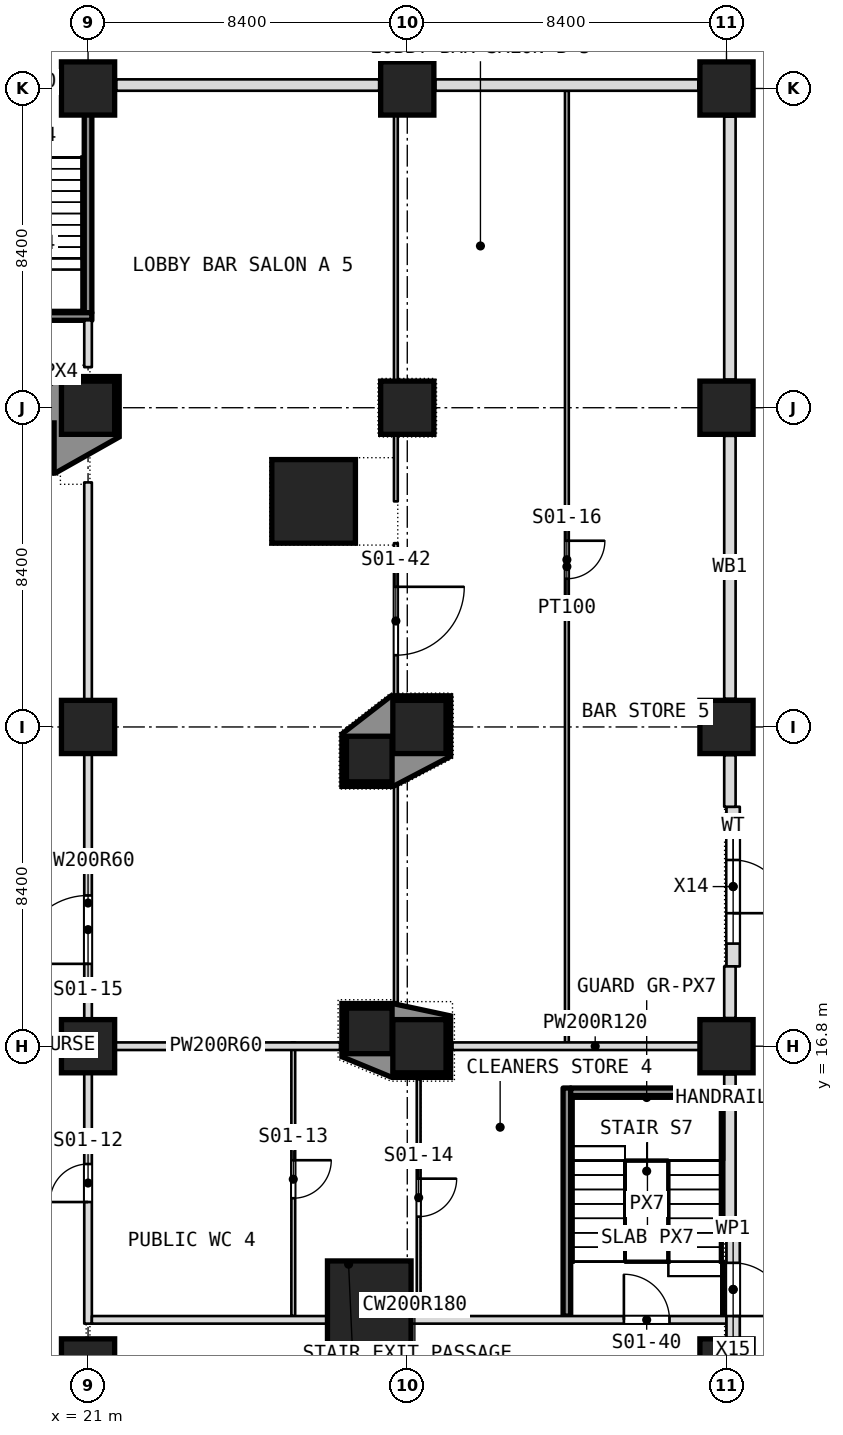
"""IFC4 building model, lengths in metres.
Left out: names, types, materials, properties, quantities, classifications, styles, units other than length and angle.
Written with IfcOpenShell. Run it as: python <this file> out.ifc"""

import sys

from ifc_helpers import new_model, si_unit, direction, frame, frame_2d, origin, origin_2d, place, context, subcontext, project, spatial, polyline, rectangle, outline, extrude, element, fill, save


model = new_model("IFC4")
c1 = context("Model", 3, precision=1e-05, world=origin(), true_north=direction((0.0, 1.0)))
c2 = subcontext(c1, "Body", "Model", "MODEL_VIEW")
j1 = project(units=[si_unit("LENGTHUNIT", "METRE"), si_unit("PLANEANGLEUNIT", "RADIAN")], contexts=[c1])
p1 = place(None, origin())
s1 = spatial("IfcSite", under=j1, at=p1, CompositionType="ELEMENT")
p2 = place(p1, origin())
s2 = spatial("IfcBuilding", under=s1, at=p2, CompositionType="ELEMENT")
p3 = place(p2, origin())
s3 = spatial("IfcBuildingStorey", under=s2, at=p3, CompositionType="ELEMENT", Elevation=0.0)
for number, where, z_axis, x_axis in (
    (1, (21.0, 8.4, -0.3), (0.0, 0.0, 1.0), (1.0, 0.0, 0.0)),
    (2, (37.8, 8.4, -0.3), (0.0, 0.0, 1.0), (1.0, 0.0, 0.0)),
    (3, (21.0, 16.8, -0.3), (0.0, 0.0, 1.0), (1.0, 0.0, 0.0)),
    (4, (29.72, 16.8, -0.3), (0.0, 0.0, 1.0), (1.0, 0.0, 0.0)),
    (5, (37.8, 16.8, -0.3), (0.0, 0.0, 1.0), (1.0, 0.0, 0.0)),
    (6, (21.0, 25.2, -0.3), (0.0, 0.0, 1.0), (1.0, 0.0, 0.0)),
    (7, (29.72, 25.2, -0.3), (0.0, 0.0, 1.0), (1.0, 0.0, 0.0)),
    (8, (37.8, 25.2, -0.3), (0.0, 0.0, 1.0), (1.0, 0.0, 0.0)),
    (9, (21.0, 33.6, -0.3), (0.0, 0.0, 1.0), (1.0, 0.0, 0.0)),
    (10, (29.4, 33.6, -0.3), (0.0, 0.0, 1.0), (1.0, 0.0, 0.0)),
    (11, (37.8, 33.6, -0.3), (0.0, 0.0, 1.0), (1.0, 0.0, 0.0)),
    (12, (21.0, 42.0, -0.3), (0.0, 0.0, 1.0), (1.0, 0.0, 0.0)),
    (13, (29.4, 42.0, -0.3), (0.0, 0.0, 1.0), (1.0, 0.0, 0.0)),
    (14, (37.8, 42.0, -0.3), (0.0, 0.0, 1.0), (1.0, 0.0, 0.0)),
):
    element("IfcColumn", number, at=place(p3, frame(where, z_axis=z_axis, x_axis=x_axis)), inside=s3, PredefinedType="COLUMN", context=c2, shape_type="SweptSolid", body=[
        extrude(rectangle(XDim=1.4, YDim=1.4, at=origin_2d()), origin(), (0.0, 0.0, 1.0), 8.3),
    ])
for number, where, z_axis, x_axis in (
    (15, (28.4, 10.05, -0.3), (0.0, 0.0, 1.0), (1.0, 0.0, 0.0)),
    (16, (26.936, 31.135, -0.3), (0.0, 0.0, 1.0), (1.0, 0.0, 0.0)),
):
    element("IfcColumn", number, at=place(p3, frame(where, z_axis=z_axis, x_axis=x_axis)), inside=s3, PredefinedType="COLUMN", context=c2, shape_type="SweptSolid", body=[
        extrude(rectangle(XDim=2.2, YDim=2.2, at=origin_2d()), origin(), (0.0, 0.0, 1.0), 8.3),
    ])
for number, where, z_axis, x_axis in (
    (17, (19.507, 32.6, -0.3), (0.0, 0.0, 1.0), (1.0, 0.0, 0.0)),
    (18, (28.4, 24.356, -0.3), (0.0, 0.0, 1.0), (1.0, 0.0, 0.0)),
    (19, (28.4, 17.203, -0.3), (0.0, 0.0, 1.0), (1.0, 0.0, 0.0)),
):
    element("IfcColumn", number, at=place(p3, frame(where, z_axis=z_axis, x_axis=x_axis)), inside=s3, PredefinedType="COLUMN", context=c2, shape_type="SweptSolid", body=[
        extrude(rectangle(XDim=1.2, YDim=1.2, at=origin_2d()), origin(), (0.0, 0.0, 1.0), 8.3),
    ])
p4 = place(p3, frame((33.6, 9.7, 0.0), z_axis=(0.0, 0.0, 1.0), x_axis=(0.0, 1.0, 0.0)))
e20 = element("IfcWall", 20, at=p4, inside=s3, PredefinedType="PARTITIONING", context=c2, shape_type="SweptSolid", body=[
    extrude(rectangle(XDim=6.0, YDim=0.2, at=frame_2d((3.0, 0.0))), origin(), (0.0, 0.0, 1.0), 7.68),
])
p5 = place(p3, frame((33.6, 16.9, 0.0), z_axis=(0.0, 0.0, 1.0), x_axis=(0.0, 1.0, 0.0)))
e21 = element("IfcWall", 21, at=p5, inside=s3, PredefinedType="PARTITIONING", context=c2, shape_type="SweptSolid", body=[
    extrude(rectangle(XDim=25.04, YDim=0.1, at=frame_2d((12.52, 0.0))), origin(), (0.0, 0.0, 1.0), 7.68),
])
p6 = place(p5, frame((12.2, 0.0, 0.0)))
e22 = element("IfcOpeningElement", 22, at=p6, cuts=e21, PredefinedType="OPENING", context=c2, shape_type="SweptSolid", body=[
    extrude(rectangle(XDim=1.0, YDim=2.1, at=frame_2d((0.5, 1.05))), frame((0.0, 0.05, 0.0), z_axis=(0.0, -1.0, 0.0), x_axis=(1.0, 0.0, 0.0)), (0.0, 0.0, 1.0), 0.1),
])
p7 = place(p3, frame((29.7, 9.7, 0.0), z_axis=(0.0, 0.0, 1.0), x_axis=(0.0, 1.0, 0.0)))
e23 = element("IfcWall", 23, at=p7, inside=s3, PredefinedType="PARTITIONING", context=c2, shape_type="SweptSolid", body=[
    extrude(rectangle(XDim=6.23, YDim=0.1, at=frame_2d((3.115, 0.0))), origin(), (0.0, 0.0, 1.0), 7.68),
])
p8 = place(p7, frame((2.615, 0.0, 0.0)))
e24 = element("IfcOpeningElement", 24, at=p8, cuts=e23, PredefinedType="OPENING", context=c2, shape_type="SweptSolid", body=[
    extrude(rectangle(XDim=1.0, YDim=2.1, at=frame_2d((0.5, 1.05))), frame((0.0, 0.05, 0.0), z_axis=(0.0, -1.0, 0.0), x_axis=(1.0, 0.0, 0.0)), (0.0, 0.0, 1.0), 0.1),
])
p9 = place(p3, frame((29.1, 17.956, 0.0), z_axis=(0.0, 0.0, 1.0), x_axis=(0.0, 1.0, 0.0)))
e25 = element("IfcWall", 25, at=p9, inside=s3, PredefinedType="PARTITIONING", context=c2, shape_type="SweptSolid", body=[
    extrude(rectangle(XDim=5.695, YDim=0.1, at=frame_2d((2.847, 0.0))), origin(), (0.0, 0.0, 1.0), 7.68),
])
p10 = place(p3, frame((29.1, 26.04, 0.0), z_axis=(0.0, 0.0, 1.0), x_axis=(0.0, 1.0, 0.0)))
e26 = element("IfcWall", 26, at=p10, inside=s3, PredefinedType="PARTITIONING", context=c2, shape_type="SweptSolid", body=[
    extrude(rectangle(XDim=3.996, YDim=0.1, at=frame_2d((1.998, 0.0))), origin(), (0.0, 0.0, 1.0), 7.68),
])
p11 = place(p10, frame((1.048, 0.0, 0.0)))
e27 = element("IfcOpeningElement", 27, at=p11, cuts=e26, PredefinedType="OPENING", context=c2, shape_type="SweptSolid", body=[
    extrude(rectangle(XDim=1.8, YDim=2.1, at=frame_2d((0.9, 1.05))), frame((0.0, 0.05, 0.0), z_axis=(0.0, -1.0, 0.0), x_axis=(1.0, 0.0, 0.0)), (0.0, 0.0, 1.0), 0.1),
])
p12 = place(p3, frame((29.1, 31.136, 0.0), z_axis=(0.0, 0.0, 1.0), x_axis=(0.0, 1.0, 0.0)))
e28 = element("IfcWall", 28, at=p12, inside=s3, PredefinedType="PARTITIONING", context=c2, shape_type="SweptSolid", body=[
    extrude(rectangle(XDim=1.744, YDim=0.1, at=frame_2d((0.872, 0.0))), origin(), (0.0, 0.0, 1.0), 7.68),
])
p13 = place(p3, frame((29.1, 34.32, 0.0), z_axis=(0.0, 0.0, 1.0), x_axis=(0.0, 1.0, 0.0)))
e29 = element("IfcWall", 29, at=p13, inside=s3, PredefinedType="PARTITIONING", context=c2, shape_type="SweptSolid", body=[
    extrude(rectangle(XDim=7.98, YDim=0.1, at=frame_2d((3.99, 0.0))), origin(), (0.0, 0.0, 1.0), 7.68),
])
p14 = place(p3, frame((26.4, 9.7, 0.0), z_axis=(0.0, 0.0, 1.0), x_axis=(0.0, 1.0, 0.0)))
e30 = element("IfcWall", 30, at=p14, inside=s3, PredefinedType="PARTITIONING", context=c2, shape_type="SweptSolid", body=[
    extrude(rectangle(XDim=7.2, YDim=0.1, at=frame_2d((3.6, 0.0))), origin(), (0.0, 0.0, 1.0), 7.68),
])
p15 = place(p14, frame((3.1, 0.0, 0.0)))
e31 = element("IfcOpeningElement", 31, at=p15, cuts=e30, PredefinedType="OPENING", context=c2, shape_type="SweptSolid", body=[
    extrude(rectangle(XDim=1.0, YDim=2.1, at=frame_2d((0.5, 1.05))), frame((0.0, 0.05, 0.0), z_axis=(0.0, -1.0, 0.0), x_axis=(1.0, 0.0, 0.0)), (0.0, 0.0, 1.0), 0.1),
])
p16 = place(p3, frame((21.0, 9.5, 0.0), z_axis=(0.0, 0.0, 1.0), x_axis=(0.0, 1.0, 0.0)))
e32 = element("IfcWall", 32, at=p16, inside=s3, PredefinedType="PARTITIONING", context=c2, shape_type="SweptSolid", body=[
    extrude(rectangle(XDim=22.135, YDim=0.2, at=frame_2d((11.067, 0.0))), origin(), (0.0, 0.0, 1.0), 7.68),
])
p17 = place(p16, frame((3.2, 0.0, 0.0)))
e33 = element("IfcOpeningElement", 33, at=p17, cuts=e32, PredefinedType="OPENING", context=c2, shape_type="SweptSolid", body=[
    extrude(rectangle(XDim=1.0, YDim=2.1, at=frame_2d((0.5, 1.05))), frame((0.0, 0.1, 0.0), z_axis=(0.0, -1.0, 0.0), x_axis=(1.0, 0.0, 0.0)), (0.0, 0.0, 1.0), 0.2),
])
p18 = place(p16, frame((9.467, 0.0, 0.0)))
e34 = element("IfcOpeningElement", 34, at=p18, cuts=e32, PredefinedType="OPENING", context=c2, shape_type="SweptSolid", body=[
    extrude(rectangle(XDim=1.8, YDim=2.1, at=frame_2d((0.9, 1.05))), frame((0.0, 0.1, 0.0), z_axis=(0.0, -1.0, 0.0), x_axis=(1.0, 0.0, 0.0)), (0.0, 0.0, 1.0), 0.2),
])
p19 = place(p3, frame((21.0, 34.668, 0.0), z_axis=(0.0, 0.0, 1.0), x_axis=(0.0, 1.0, 0.0)))
e35 = element("IfcWall", 35, at=p19, inside=s3, PredefinedType="PARTITIONING", context=c2, shape_type="SweptSolid", body=[
    extrude(rectangle(XDim=1.232, YDim=0.2, at=frame_2d((0.616, 0.0))), origin(), (0.0, 0.0, 1.0), 7.68),
])
p20 = place(p3, frame((21.0, 36.1, 0.0), z_axis=(0.0, 0.0, 1.0), x_axis=(0.0, 1.0, 0.0)))
e36 = element("IfcWall", 36, at=p20, inside=s3, PredefinedType="PARTITIONING", context=c2, shape_type="SweptSolid", body=[
    extrude(rectangle(XDim=6.2, YDim=0.2, at=frame_2d((3.1, 0.0))), origin(), (0.0, 0.0, 1.0), 7.68),
])
p21 = place(p3, frame((21.1, 9.6, 0.0), z_axis=(0.0, 0.0, 1.0), x_axis=(1.0, 0.0, 0.0)))
e37 = element("IfcWall", 37, at=p21, inside=s3, PredefinedType="PARTITIONING", context=c2, shape_type="SweptSolid", body=[
    extrude(rectangle(XDim=16.7, YDim=0.2, at=frame_2d((8.35, 0.0))), origin(), (0.0, 0.0, 1.0), 7.68),
])
p22 = place(p21, frame((14.0, 0.0, 0.0)))
e38 = element("IfcOpeningElement", 38, at=p22, cuts=e37, PredefinedType="OPENING", context=c2, shape_type="SweptSolid", body=[
    extrude(rectangle(XDim=1.2, YDim=2.1, at=frame_2d((0.6, 1.05))), frame((0.0, 0.1, 0.0), z_axis=(0.0, -1.0, 0.0), x_axis=(1.0, 0.0, 0.0)), (0.0, 0.0, 1.0), 0.2),
])
p23 = place(p3, frame((33.7, 15.6, 0.0), z_axis=(0.0, 0.0, 1.0), x_axis=(1.0, 0.0, 0.0)))
e39 = element("IfcWall", 39, at=p23, inside=s3, PredefinedType="PARTITIONING", context=c2, shape_type="SweptSolid", body=[
    extrude(rectangle(XDim=4.04, YDim=0.2, at=frame_2d((2.02, 0.0))), origin(), (0.0, 0.0, 1.0), 7.68),
])
p24 = place(p3, frame((21.1, 16.8, 0.0), z_axis=(0.0, 0.0, 1.0), x_axis=(1.0, 0.0, 0.0)))
e40 = element("IfcWall", 40, at=p24, inside=s3, PredefinedType="PARTITIONING", context=c2, shape_type="SweptSolid", body=[
    extrude(rectangle(XDim=6.53, YDim=0.2, at=frame_2d((3.265, 0.0))), origin(), (0.0, 0.0, 1.0), 7.68),
])
p25 = place(p3, frame((30.59, 16.8, 0.0), z_axis=(0.0, 0.0, 1.0), x_axis=(1.0, 0.0, 0.0)))
e41 = element("IfcWall", 41, at=p25, inside=s3, PredefinedType="PARTITIONING", context=c2, shape_type="SweptSolid", body=[
    extrude(rectangle(XDim=7.51, YDim=0.2, at=frame_2d((3.755, 0.0))), origin(), (0.0, 0.0, 1.0), 7.68),
])
p26 = place(p3, frame((16.7, 36.0, 0.0), z_axis=(0.0, 0.0, 1.0), x_axis=(1.0, 0.0, 0.0)))
e42 = element("IfcWall", 42, at=p26, inside=s3, PredefinedType="PARTITIONING", context=c2, shape_type="SweptSolid", body=[
    extrude(rectangle(XDim=4.4, YDim=0.2, at=frame_2d((2.2, 0.0))), origin(), (0.0, 0.0, 1.0), 7.68),
])
p27 = place(p26, frame((1.6, 0.0, 0.0)))
e43 = element("IfcOpeningElement", 43, at=p27, cuts=e42, PredefinedType="OPENING", context=c2, shape_type="SweptSolid", body=[
    extrude(rectangle(XDim=1.2, YDim=2.1, at=frame_2d((0.6, 1.05))), frame((0.0, 0.1, 0.0), z_axis=(0.0, -1.0, 0.0), x_axis=(1.0, 0.0, 0.0)), (0.0, 0.0, 1.0), 0.2),
])
p28 = place(p3, frame((37.975, 18.9, 0.0), z_axis=(0.0, 0.0, 1.0), x_axis=(0.0, 1.0, 0.0)))
e44 = element("IfcWall", 44, at=p28, inside=s3, PredefinedType="NOTDEFINED", context=c2, shape_type="SweptSolid", body=[
    extrude(rectangle(XDim=4.2, YDim=0.35, at=frame_2d((2.1, 0.0))), origin(), (0.0, 0.0, 1.0), 6.78),
])
p29 = place(p28, frame((1.4, 0.0, 0.0)))
e45 = element("IfcOpeningElement", 45, at=p29, cuts=e44, PredefinedType="OPENING", context=c2, shape_type="SweptSolid", body=[
    extrude(rectangle(XDim=1.4, YDim=2.2, at=frame_2d((0.7, 1.1))), frame((0.0, 0.175, 0.0), z_axis=(0.0, -1.0, 0.0), x_axis=(1.0, 0.0, 0.0)), (0.0, 0.0, 1.0), 0.35),
])
p30 = place(p28, frame((0.6, 0.0, 2.9)))
e46 = element("IfcOpeningElement", 46, at=p30, cuts=e44, PredefinedType="OPENING", context=c2, shape_type="SweptSolid", body=[
    extrude(rectangle(XDim=3.0, YDim=2.6, at=frame_2d((1.5, 1.3))), frame((0.0, 0.175, 0.0), z_axis=(0.0, -1.0, 0.0), x_axis=(1.0, 0.0, 0.0)), (0.0, 0.0, 1.0), 0.35),
])
p31 = place(p3, frame((37.975, 9.1, 0.0), z_axis=(0.0, 0.0, 1.0), x_axis=(0.0, 1.0, 0.0)))
e47 = element("IfcWall", 47, at=p31, inside=s3, PredefinedType="NOTDEFINED", context=c2, shape_type="SweptSolid", body=[
    extrude(rectangle(XDim=2.6, YDim=0.35, at=frame_2d((1.3, 0.0))), origin(), (0.0, 0.0, 1.0), 8.0),
])
p32 = place(p31, frame((0.6, 0.0, 0.0)))
e48 = element("IfcOpeningElement", 48, at=p32, cuts=e47, PredefinedType="OPENING", context=c2, shape_type="SweptSolid", body=[
    extrude(rectangle(XDim=1.4, YDim=2.2, at=frame_2d((0.7, 1.1))), frame((0.0, 0.175, 0.0), z_axis=(0.0, -1.0, 0.0), x_axis=(1.0, 0.0, 0.0)), (0.0, 0.0, 1.0), 0.35),
])
p33 = place(p3, frame((37.89, 11.7, 0.0), z_axis=(0.0, 0.0, 1.0), x_axis=(0.0, 1.0, 0.0)))
e49 = element("IfcWall", 49, at=p33, inside=s3, PredefinedType="NOTDEFINED", context=c2, shape_type="SweptSolid", body=[
    extrude(rectangle(XDim=4.36, YDim=0.3, at=frame_2d((2.18, 0.0))), origin(), (0.0, 0.0, 1.0), 8.0),
])
for number, where, z_axis, x_axis in (
    (50, (37.89, 17.54, 0.0), (0.0, 0.0, 1.0), (0.0, 1.0, 0.0)),
    (51, (37.89, 23.1, 0.0), (0.0, 0.0, 1.0), (0.0, 1.0, 0.0)),
):
    element("IfcWall", number, at=place(p3, frame(where, z_axis=z_axis, x_axis=x_axis)), inside=s3, PredefinedType="NOTDEFINED", context=c2, shape_type="SweptSolid", body=[
        extrude(rectangle(XDim=1.36, YDim=0.3, at=frame_2d((0.68, 0.0))), origin(), (0.0, 0.0, 1.0), 6.78),
    ])
p34 = place(p3, frame((37.89, 25.94, 0.0), z_axis=(0.0, 0.0, 1.0), x_axis=(0.0, 1.0, 0.0)))
e52 = element("IfcWall", 52, at=p34, inside=s3, PredefinedType="NOTDEFINED", context=c2, shape_type="SweptSolid", body=[
    extrude(rectangle(XDim=6.92, YDim=0.3, at=frame_2d((3.46, 0.0))), origin(), (0.0, 0.0, 1.0), 6.78),
])
p35 = place(p3, frame((37.89, 34.34, 0.0), z_axis=(0.0, 0.0, 1.0), x_axis=(0.0, 1.0, 0.0)))
e53 = element("IfcWall", 53, at=p35, inside=s3, PredefinedType="NOTDEFINED", context=c2, shape_type="SweptSolid", body=[
    extrude(rectangle(XDim=6.92, YDim=0.3, at=frame_2d((3.46, 0.0))), origin(), (0.0, 0.0, 1.0), 6.78),
])
p36 = place(p3, frame((20.2, 42.175, 0.0), z_axis=(0.0, 0.0, 1.0), x_axis=(-1.0, 0.0, 0.0)))
e54 = element("IfcWall", 54, at=p36, inside=s3, PredefinedType="NOTDEFINED", context=c2, shape_type="SweptSolid", body=[
    extrude(rectangle(XDim=4.2, YDim=0.35, at=frame_2d((2.1, 0.0))), origin(), (0.0, 0.0, 1.0), 6.78),
])
p37 = place(p36, frame((1.4, 0.0, 0.0)))
e55 = element("IfcOpeningElement", 55, at=p37, cuts=e54, PredefinedType="OPENING", context=c2, shape_type="SweptSolid", body=[
    extrude(rectangle(XDim=1.4, YDim=2.2, at=frame_2d((0.7, 1.1))), frame((0.0, 0.175, 0.0), z_axis=(0.0, -1.0, 0.0), x_axis=(1.0, 0.0, 0.0)), (0.0, 0.0, 1.0), 0.35),
])
p38 = place(p36, frame((0.6, 0.0, 2.9)))
e56 = element("IfcOpeningElement", 56, at=p38, cuts=e54, PredefinedType="OPENING", context=c2, shape_type="SweptSolid", body=[
    extrude(rectangle(XDim=3.0, YDim=2.6, at=frame_2d((1.5, 1.3))), frame((0.0, 0.175, 0.0), z_axis=(0.0, -1.0, 0.0), x_axis=(1.0, 0.0, 0.0)), (0.0, 0.0, 1.0), 0.35),
])
p39 = place(p3, frame((37.06, 42.09, 0.0), z_axis=(0.0, 0.0, 1.0), x_axis=(-1.0, 0.0, 0.0)))
e57 = element("IfcWall", 57, at=p39, inside=s3, PredefinedType="NOTDEFINED", context=c2, shape_type="SweptSolid", body=[
    extrude(rectangle(XDim=6.92, YDim=0.3, at=frame_2d((3.46, 0.0))), origin(), (0.0, 0.0, 1.0), 6.78),
])
p40 = place(p3, frame((28.66, 42.09, 0.0), z_axis=(0.0, 0.0, 1.0), x_axis=(-1.0, 0.0, 0.0)))
e58 = element("IfcWall", 58, at=p40, inside=s3, PredefinedType="NOTDEFINED", context=c2, shape_type="SweptSolid", body=[
    extrude(rectangle(XDim=6.92, YDim=0.3, at=frame_2d((3.46, 0.0))), origin(), (0.0, 0.0, 1.0), 6.78),
])
p41 = place(p3, origin())
e59 = element("IfcWall", 59, at=p41, inside=s3, PredefinedType="SOLIDWALL", context=c2, shape_type="SweptSolid", body=[
    extrude(outline(polyline([(20.258, 34.42), (21.82, 34.42), (21.82, 32.83), (20.138, 31.88), (18.787, 31.88), (18.787, 33.258), (20.258, 34.42)]), holes=[polyline([(21.7, 32.9), (21.7, 34.3), (20.3, 34.3), (20.3, 32.9), (21.7, 32.9)]), polyline([(20.107, 32.0), (20.107, 33.2), (18.907, 33.2), (18.907, 32.0), (20.107, 32.0)])]), origin(), (0.0, 0.0, 1.0), 8.0),
])
p42 = place(p3, origin())
e60 = element("IfcWall", 60, at=p42, inside=s3, PredefinedType="SOLIDWALL", context=c2, shape_type="SweptSolid", body=[
    extrude(outline(polyline([(28.979, 26.02), (30.54, 26.02), (30.54, 24.427), (29.03, 23.636), (27.68, 23.636), (27.68, 25.015), (28.979, 26.02)]), holes=[polyline([(30.42, 24.5), (30.42, 25.9), (29.02, 25.9), (29.02, 24.5), (30.42, 24.5)]), polyline([(29.0, 23.756), (29.0, 24.956), (27.8, 24.956), (27.8, 23.756), (29.0, 23.756)])]), origin(), (0.0, 0.0, 1.0), 8.0),
])
p43 = place(p3, origin())
e61 = element("IfcWall", 61, at=p43, inside=s3, PredefinedType="SOLIDWALL", context=c2, shape_type="SweptSolid", body=[
    extrude(outline(polyline([(27.68, 16.523), (27.68, 17.923), (29.013, 17.923), (30.54, 17.597), (30.54, 15.98), (28.996, 15.98), (27.68, 16.523)]), holes=[polyline([(29.02, 16.1), (30.42, 16.1), (30.42, 17.5), (29.02, 17.5), (29.02, 16.1)]), polyline([(27.8, 16.603), (29.0, 16.603), (29.0, 17.803), (27.8, 17.803), (27.8, 16.603)])]), origin(), (0.0, 0.0, 1.0), 8.0),
])
p44 = place(p6, origin())
e62 = element("IfcDoor", 62, at=p44, inside=s3, OperationType="SINGLE_SWING_RIGHT", PredefinedType="DOOR", context=c2, shape_type="SweptSolid", body=[
    extrude(rectangle(XDim=1.0, YDim=2.1, at=frame_2d((0.5, 1.05))), frame((0.0, 0.025, 0.0), z_axis=(0.0, -1.0, 0.0), x_axis=(1.0, 0.0, 0.0)), (0.0, 0.0, 1.0), 0.05),
])
fill(e22, e62)
p45 = place(p8, origin())
e63 = element("IfcDoor", 63, at=p45, inside=s3, OperationType="SINGLE_SWING_RIGHT", PredefinedType="DOOR", context=c2, shape_type="SweptSolid", body=[
    extrude(rectangle(XDim=1.0, YDim=2.1, at=frame_2d((0.5, 1.05))), frame((0.0, 0.025, 0.0), z_axis=(0.0, -1.0, 0.0), x_axis=(1.0, 0.0, 0.0)), (0.0, 0.0, 1.0), 0.05),
])
fill(e24, e63)
p46 = place(p11, origin())
e64 = element("IfcDoor", 64, at=p46, inside=s3, OperationType="DOUBLE_DOOR_SINGLE_SWING", PredefinedType="DOOR", context=c2, shape_type="SweptSolid", body=[
    extrude(rectangle(XDim=1.8, YDim=2.1, at=frame_2d((0.9, 1.05))), frame((0.0, 0.025, 0.0), z_axis=(0.0, -1.0, 0.0), x_axis=(1.0, 0.0, 0.0)), (0.0, 0.0, 1.0), 0.05),
])
fill(e27, e64)
p47 = place(p15, origin())
e65 = element("IfcDoor", 65, at=p47, inside=s3, OperationType="SINGLE_SWING_RIGHT", PredefinedType="DOOR", context=c2, shape_type="SweptSolid", body=[
    extrude(rectangle(XDim=1.0, YDim=2.1, at=frame_2d((0.5, 1.05))), frame((0.0, 0.025, 0.0), z_axis=(0.0, -1.0, 0.0), x_axis=(1.0, 0.0, 0.0)), (0.0, 0.0, 1.0), 0.05),
])
fill(e31, e65)
p48 = place(p17, origin())
e66 = element("IfcDoor", 66, at=p48, inside=s3, OperationType="SINGLE_SWING_LEFT", PredefinedType="DOOR", context=c2, shape_type="SweptSolid", body=[
    extrude(rectangle(XDim=1.0, YDim=2.1, at=frame_2d((0.5, 1.05))), frame((0.0, 0.025, 0.0), z_axis=(0.0, -1.0, 0.0), x_axis=(1.0, 0.0, 0.0)), (0.0, 0.0, 1.0), 0.05),
])
fill(e33, e66)
p49 = place(p18, origin())
e67 = element("IfcDoor", 67, at=p49, inside=s3, OperationType="DOUBLE_DOOR_SINGLE_SWING", PredefinedType="DOOR", context=c2, shape_type="SweptSolid", body=[
    extrude(rectangle(XDim=1.8, YDim=2.1, at=frame_2d((0.9, 1.05))), frame((0.0, 0.025, 0.0), z_axis=(0.0, -1.0, 0.0), x_axis=(1.0, 0.0, 0.0)), (0.0, 0.0, 1.0), 0.05),
])
fill(e34, e67)
p50 = place(p22, origin())
e68 = element("IfcDoor", 68, at=p50, inside=s3, OperationType="SINGLE_SWING_LEFT", PredefinedType="DOOR", context=c2, shape_type="SweptSolid", body=[
    extrude(rectangle(XDim=1.2, YDim=2.1, at=frame_2d((0.6, 1.05))), frame((0.0, 0.025, 0.0), z_axis=(0.0, -1.0, 0.0), x_axis=(1.0, 0.0, 0.0)), (0.0, 0.0, 1.0), 0.05),
])
fill(e38, e68)
p51 = place(p29, frame((1.4, 0.0, 0.0), z_axis=(0.0, 0.0, 1.0), x_axis=(-1.0, 0.0, 0.0)))
e69 = element("IfcDoor", 69, at=p51, inside=s3, OperationType="SINGLE_SWING_LEFT", PredefinedType="DOOR", context=c2, shape_type="SweptSolid", body=[
    extrude(rectangle(XDim=1.4, YDim=2.2, at=frame_2d((0.7, 1.1))), frame((0.0, 0.025, 0.0), z_axis=(0.0, -1.0, 0.0), x_axis=(1.0, 0.0, 0.0)), (0.0, 0.0, 1.0), 0.05),
])
fill(e45, e69)
p52 = place(p30, origin())
e70 = element("IfcWindow", 70, at=p52, inside=s3, PartitioningType="SINGLE_PANEL", PredefinedType="WINDOW", context=c2, shape_type="SweptSolid", body=[
    extrude(rectangle(XDim=3.0, YDim=2.6, at=frame_2d((1.5, 1.3))), frame((0.0, 0.03, 0.0), z_axis=(0.0, -1.0, 0.0), x_axis=(1.0, 0.0, 0.0)), (0.0, 0.0, 1.0), 0.06),
])
fill(e46, e70)
p53 = place(p32, frame((1.4, 0.0, 0.0), z_axis=(0.0, 0.0, 1.0), x_axis=(-1.0, 0.0, 0.0)))
e71 = element("IfcDoor", 71, at=p53, inside=s3, OperationType="SINGLE_SWING_LEFT", PredefinedType="DOOR", context=c2, shape_type="SweptSolid", body=[
    extrude(rectangle(XDim=1.4, YDim=2.2, at=frame_2d((0.7, 1.1))), frame((0.0, 0.025, 0.0), z_axis=(0.0, -1.0, 0.0), x_axis=(1.0, 0.0, 0.0)), (0.0, 0.0, 1.0), 0.05),
])
fill(e48, e71)
save(model, sys.argv[1])
